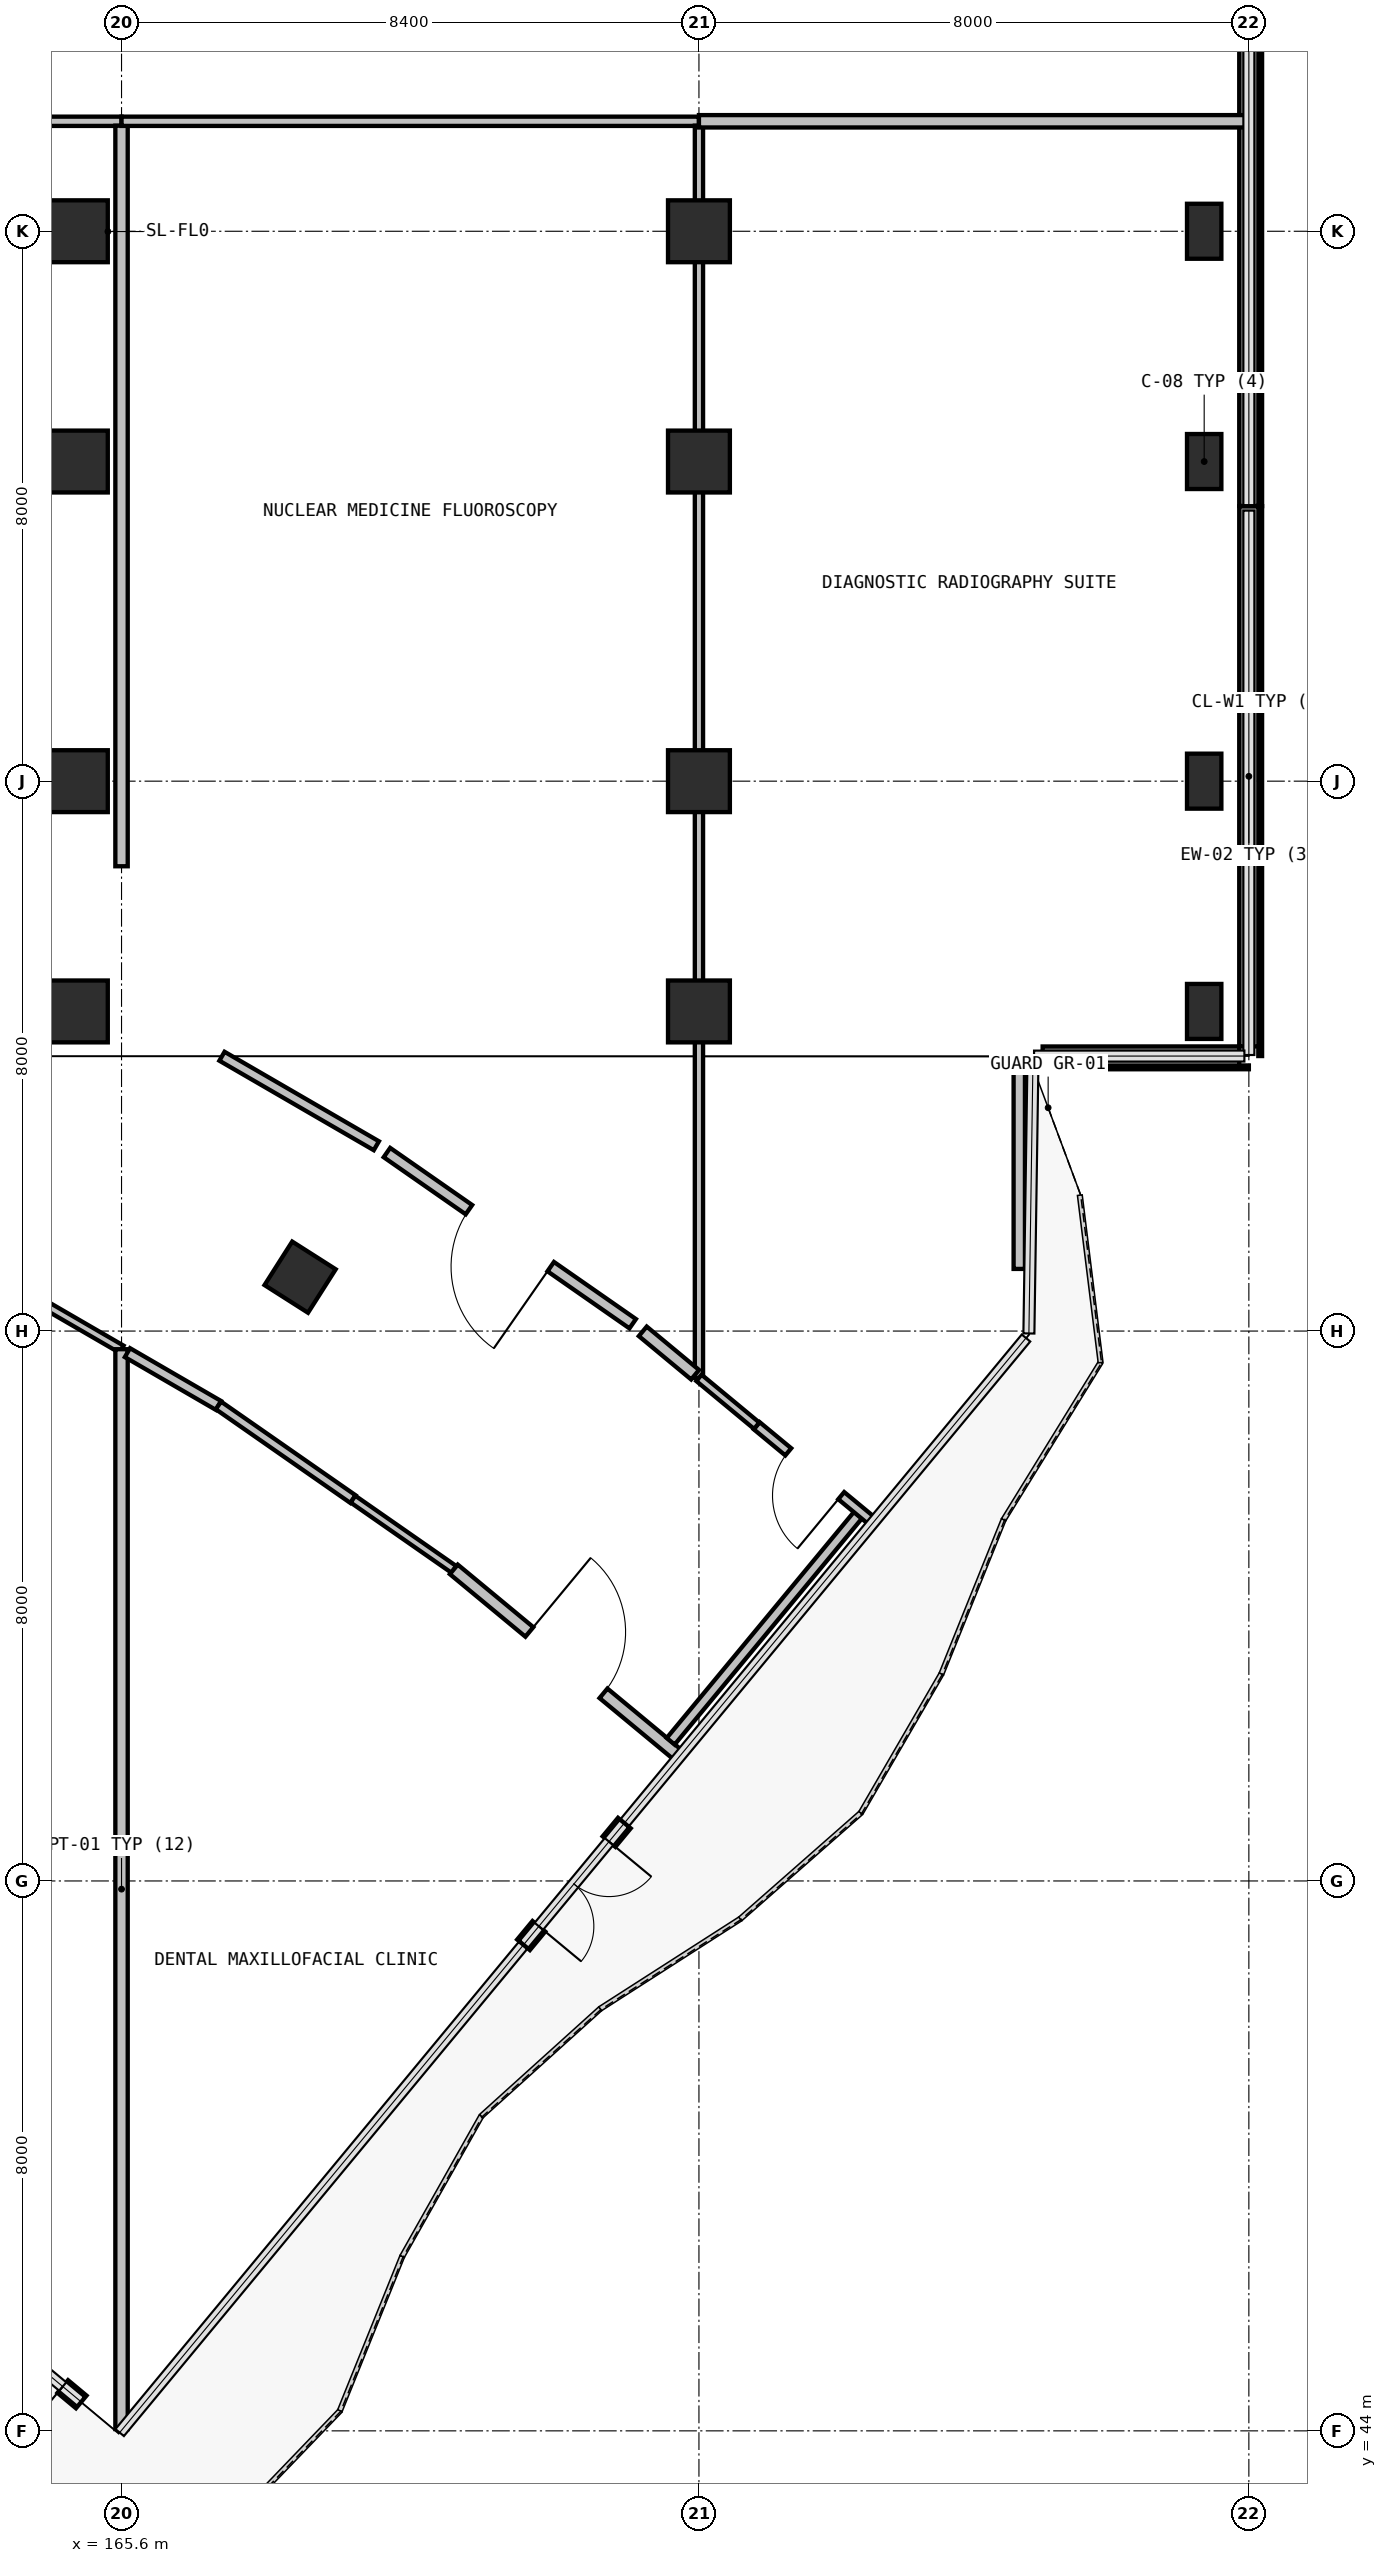
"""IFC4 building model, lengths in metres.
Left out: names, types, materials, properties, quantities, classifications, styles, units other than length and angle.
Written with IfcOpenShell. Run it as: python <this file> out.ifc"""

import sys

from ifc_helpers import new_model, si_unit, direction, frame, frame_2d, origin, origin_2d, place, context, subcontext, project, spatial, rectangle, extrude, element, fill, save


model = new_model("IFC4")
c1 = context("Model", 3, precision=1e-05, world=origin(), true_north=direction((0.0, 1.0)))
c2 = subcontext(c1, "Body", "Model", "MODEL_VIEW")
j1 = project(units=[si_unit("LENGTHUNIT", "METRE"), si_unit("PLANEANGLEUNIT", "RADIAN")], contexts=[c1])
p1 = place(None, origin())
s1 = spatial("IfcSite", under=j1, at=p1, CompositionType="ELEMENT")
p2 = place(p1, origin())
s2 = spatial("IfcBuilding", under=s1, at=p2, CompositionType="ELEMENT")
p3 = place(p2, origin())
s3 = spatial("IfcBuildingStorey", under=s2, at=p3, CompositionType="ELEMENT", Elevation=0.0)
for number, where, z_axis, x_axis in (
    (1, (164.95, 64.65, 0.0), (0.0, 0.0, 1.0), (1.0, 0.0, 0.0)),
    (2, (164.95, 68.0, 0.0), (0.0, 0.0, 1.0), (1.0, 0.0, 0.0)),
    (3, (164.95, 72.65, 0.0), (0.0, 0.0, 1.0), (1.0, 0.0, 0.0)),
    (4, (164.95, 76.0, 0.0), (0.0, 0.0, 1.0), (1.0, 0.0, 0.0)),
    (5, (174.0, 64.65, 0.0), (0.0, 0.0, 1.0), (1.0, 0.0, 0.0)),
    (6, (174.0, 68.0, 0.0), (0.0, 0.0, 1.0), (1.0, 0.0, 0.0)),
    (7, (174.0, 72.65, 0.0), (0.0, 0.0, 1.0), (1.0, 0.0, 0.0)),
    (8, (174.0, 76.0, 0.0), (0.0, 0.0, 1.0), (1.0, 0.0, 0.0)),
):
    element("IfcColumn", number, at=place(p3, frame(where, z_axis=z_axis, x_axis=x_axis)), inside=s3, PredefinedType="COLUMN", context=c2, shape_type="SweptSolid", body=[
        extrude(rectangle(XDim=0.9, YDim=0.9, at=origin_2d()), origin(), (0.0, 0.0, 1.0), 5.4),
    ])
for number, where, z_axis, x_axis in (
    (9, (181.35, 64.65, 0.0), (0.0, 0.0, 1.0), (1.0, 0.0, 0.0)),
    (10, (181.35, 68.0, 0.0), (0.0, 0.0, 1.0), (1.0, 0.0, 0.0)),
    (11, (181.35, 72.65, 0.0), (0.0, 0.0, 1.0), (1.0, 0.0, 0.0)),
    (12, (181.35, 76.0, 0.0), (0.0, 0.0, 1.0), (1.0, 0.0, 0.0)),
):
    element("IfcColumn", number, at=place(p3, frame(where, z_axis=z_axis, x_axis=x_axis)), inside=s3, PredefinedType="COLUMN", context=c2, shape_type="SweptSolid", body=[
        extrude(rectangle(XDim=0.5, YDim=0.8, at=origin_2d()), origin(), (0.0, 0.0, 1.0), 5.4),
    ])
p4 = place(p3, frame((168.198, 60.784, 0.0), z_axis=(0.0, 0.0, 1.0), x_axis=(0.537064068078, 0.843541455282, 0.0)))
e13 = element("IfcColumn", 13, at=p4, inside=s3, PredefinedType="COLUMN", context=c2, shape_type="SweptSolid", body=[
    extrude(rectangle(XDim=0.75, YDim=0.75, at=origin_2d()), origin(), (0.0, 0.0, 1.0), 5.4),
])
p5 = place(p3, frame((182.0, 79.999, 0.0), z_axis=(0.0, 0.0, 1.0), x_axis=(0.0, -1.0, 0.0)))
e14 = element("IfcWall", 14, at=p5, inside=s3, PredefinedType="SOLIDWALL", context=c2, shape_type="SweptSolid", body=[
    extrude(rectangle(XDim=7.996, YDim=0.28, at=frame_2d((3.998, 0.0))), origin(), (0.0, 0.0, 1.0), 0.94),
])
p6 = place(p3, frame((182.0, 71.999, 0.0), z_axis=(0.0, 0.0, 1.0), x_axis=(0.0, -1.0, 0.0)))
e15 = element("IfcWall", 15, at=p6, inside=s3, PredefinedType="SOLIDWALL", context=c2, shape_type="SweptSolid", body=[
    extrude(rectangle(XDim=7.858, YDim=0.28, at=frame_2d((3.929, 0.0))), origin(), (0.0, 0.0, 1.0), 0.94),
])
p7 = place(p3, frame((181.86, 64.001, 0.0), z_axis=(0.0, 0.0, 1.0), x_axis=(-0.999999941708, -0.000341442575, 0.0)))
e16 = element("IfcWall", 16, at=p7, inside=s3, PredefinedType="SOLIDWALL", context=c2, shape_type="SweptSolid", body=[
    extrude(rectangle(XDim=2.86, YDim=0.28, at=frame_2d((1.43, 0.0))), origin(), (0.0, 0.0, 1.0), 0.94),
])
p8 = place(p3, frame((172.915, 52.842, 0.0), z_axis=(0.0, 0.0, 1.0), x_axis=(-0.637926137679, -0.770097554123, 0.0)))
e17 = element("IfcWall", 17, at=p8, inside=s3, PredefinedType="SOLIDWALL", context=c2, shape_type="SweptSolid", body=[
    extrude(rectangle(XDim=2.3, YDim=0.24, at=frame_2d((1.15, 0.0))), origin(), (0.0, 0.0, 1.0), 2.32),
])
p9 = place(p8, frame((0.35, 0.0, 0.0)))
e18 = element("IfcOpeningElement", 18, at=p9, cuts=e17, PredefinedType="OPENING", context=c2, shape_type="SweptSolid", body=[
    extrude(rectangle(XDim=1.6, YDim=2.2, at=frame_2d((0.8, 1.1))), frame((0.0, 0.13, 0.0), z_axis=(0.0, -1.0, 0.0), x_axis=(1.0, 0.0, 0.0)), (0.0, 0.0, 1.0), 0.26),
])
p10 = place(p3, frame((165.014, 44.421, 0.0), z_axis=(0.0, 0.0, 1.0), x_axis=(-0.768438701021, 0.639923403833, 0.0)))
e19 = element("IfcWall", 19, at=p10, inside=s3, PredefinedType="SOLIDWALL", context=c2, shape_type="SweptSolid", body=[
    extrude(rectangle(XDim=2.301, YDim=0.24, at=frame_2d((1.15, 0.0))), origin(), (0.0, 0.0, 1.0), 2.32),
])
p11 = place(p10, frame((0.35, 0.0, 0.0)))
e20 = element("IfcOpeningElement", 20, at=p11, cuts=e19, PredefinedType="OPENING", context=c2, shape_type="SweptSolid", body=[
    extrude(rectangle(XDim=1.6, YDim=2.2, at=frame_2d((0.8, 1.1))), frame((0.0, 0.13, 0.0), z_axis=(0.0, -1.0, 0.0), x_axis=(1.0, 0.0, 0.0)), (0.0, 0.0, 1.0), 0.26),
])
p12 = place(p3, frame((163.4, 61.012, 0.0), z_axis=(0.0, 0.0, 1.0), x_axis=(0.865071180383, -0.501649133231, 0.0)))
e21 = element("IfcWall", 21, at=p12, inside=s3, PredefinedType="PARTITIONING", context=c2, shape_type="SweptSolid", body=[
    extrude(rectangle(XDim=2.543, YDim=0.12, at=frame_2d((1.272, 0.0))), origin(), (0.0, 0.0, 1.0), 5.08),
])
p13 = place(p3, frame((165.6, 59.736, 0.0), z_axis=(0.0, 0.0, 1.0), x_axis=(0.0, -1.0, 0.0)))
e22 = element("IfcWall", 22, at=p13, inside=s3, PredefinedType="PARTITIONING", context=c2, shape_type="SweptSolid", body=[
    extrude(rectangle(XDim=15.71, YDim=0.18, at=frame_2d((7.855, 0.0))), origin(), (0.0, 0.0, 1.0), 5.08),
])
p14 = place(p3, frame((162.797, 77.6, 0.0), z_axis=(0.0, 0.0, 1.0), x_axis=(1.0, 0.0, 0.0)))
e23 = element("IfcWall", 23, at=p14, inside=s3, PredefinedType="PARTITIONING", context=c2, shape_type="SweptSolid", body=[
    extrude(rectangle(XDim=2.803, YDim=0.135, at=frame_2d((1.401, 0.0))), origin(), (0.0, 0.0, 1.0), 5.08),
])
p15 = place(p3, frame((165.6, 77.536, 0.0), z_axis=(0.0, 0.0, 1.0), x_axis=(0.0, -1.0, 0.0)))
e24 = element("IfcWall", 24, at=p15, inside=s3, PredefinedType="PARTITIONING", context=c2, shape_type="SweptSolid", body=[
    extrude(rectangle(XDim=10.774, YDim=0.18, at=frame_2d((5.387, 0.0))), origin(), (0.0, 0.0, 1.0), 5.08),
])
p16 = place(p3, frame((165.686, 59.686, 0.0), z_axis=(0.0, 0.0, 1.0), x_axis=(0.864985497408, -0.501796860565, 0.0)))
e25 = element("IfcWall", 25, at=p16, inside=s3, PredefinedType="PARTITIONING", context=c2, shape_type="SweptSolid", body=[
    extrude(rectangle(XDim=1.531, YDim=0.15, at=frame_2d((0.765, 0.0))), origin(), (0.0, 0.0, 1.0), 5.08),
])
p17 = place(p3, frame((167.01, 58.918, 0.0), z_axis=(0.0, 0.0, 1.0), x_axis=(0.820585840309, -0.571523296712, 0.0)))
e26 = element("IfcWall", 26, at=p17, inside=s3, PredefinedType="PARTITIONING", context=c2, shape_type="SweptSolid", body=[
    extrude(rectangle(XDim=2.385, YDim=0.135, at=frame_2d((1.192, 0.0))), origin(), (0.0, 0.0, 1.0), 5.08),
])
p18 = place(p3, frame((168.967, 57.555, 0.0), z_axis=(0.0, 0.0, 1.0), x_axis=(0.820532078551, -0.571600479416, 0.0)))
e27 = element("IfcWall", 27, at=p18, inside=s3, PredefinedType="PARTITIONING", context=c2, shape_type="SweptSolid", body=[
    extrude(rectangle(XDim=1.788, YDim=0.12, at=frame_2d((0.894, 0.0))), origin(), (0.0, 0.0, 1.0), 5.08),
])
p19 = place(p3, frame((170.434, 56.533, 0.0), z_axis=(0.0, 0.0, 1.0), x_axis=(0.770184287696, -0.637821419353, 0.0)))
e28 = element("IfcWall", 28, at=p19, inside=s3, PredefinedType="PARTITIONING", context=c2, shape_type="SweptSolid", body=[
    extrude(rectangle(XDim=4.253, YDim=0.18, at=frame_2d((2.127, 0.0))), origin(), (0.0, 0.0, 1.0), 5.08),
])
p20 = place(p19, frame((1.427, 0.0, 0.0)))
e29 = element("IfcOpeningElement", 29, at=p20, cuts=e28, PredefinedType="OPENING", context=c2, shape_type="SweptSolid", body=[
    extrude(rectangle(XDim=1.4, YDim=2.15, at=frame_2d((0.7, 1.075))), frame((0.0, 0.1, 0.0), z_axis=(0.0, -1.0, 0.0), x_axis=(1.0, 0.0, 0.0)), (0.0, 0.0, 1.0), 0.2),
])
p21 = place(p3, frame((173.036, 60.107, 0.0), z_axis=(0.0, 0.0, 1.0), x_axis=(-0.820574971601, 0.571538901547, 0.0)))
e30 = element("IfcWall", 30, at=p21, inside=s3, PredefinedType="PARTITIONING", context=c2, shape_type="SweptSolid", body=[
    extrude(rectangle(XDim=4.357, YDim=0.165, at=frame_2d((2.178, 0.0))), origin(), (0.0, 0.0, 1.0), 5.08),
])
p22 = place(p21, frame((1.453, 0.0, 0.0)))
e31 = element("IfcOpeningElement", 31, at=p22, cuts=e30, PredefinedType="OPENING", context=c2, shape_type="SweptSolid", body=[
    extrude(rectangle(XDim=1.45, YDim=2.15, at=frame_2d((0.725, 1.075))), frame((0.0, 0.093, 0.0), z_axis=(0.0, -1.0, 0.0), x_axis=(1.0, 0.0, 0.0)), (0.0, 0.0, 1.0), 0.185),
])
p23 = place(p3, frame((169.307, 62.696, 0.0), z_axis=(0.0, 0.0, 1.0), x_axis=(-0.86512994763, 0.501547778097, 0.0)))
e32 = element("IfcWall", 32, at=p23, inside=s3, PredefinedType="PARTITIONING", context=c2, shape_type="SweptSolid", body=[
    extrude(rectangle(XDim=2.596, YDim=0.15, at=frame_2d((1.298, 0.0))), origin(), (0.0, 0.0, 1.0), 5.08),
])
p24 = place(p3, frame((165.6, 77.6, 0.0), z_axis=(0.0, 0.0, 1.0), x_axis=(1.0, 0.0, 0.0)))
e33 = element("IfcWall", 33, at=p24, inside=s3, PredefinedType="PARTITIONING", context=c2, shape_type="SweptSolid", body=[
    extrude(rectangle(XDim=8.4, YDim=0.135, at=frame_2d((4.2, 0.0))), origin(), (0.0, 0.0, 1.0), 5.08),
])
p25 = place(p3, frame((174.0, 77.536, 0.0), z_axis=(0.0, 0.0, 1.0), x_axis=(0.0, -1.0, 0.0)))
e34 = element("IfcWall", 34, at=p25, inside=s3, PredefinedType="PARTITIONING", context=c2, shape_type="SweptSolid", body=[
    extrude(rectangle(XDim=18.217, YDim=0.12, at=frame_2d((9.108, 0.0))), origin(), (0.0, 0.0, 1.0), 4.33),
])
p26 = place(p3, frame((173.944, 59.365, 0.0), z_axis=(0.0, 0.0, 1.0), x_axis=(-0.769737243157, 0.638360851319, 0.0)))
e35 = element("IfcWall", 35, at=p26, inside=s3, PredefinedType="PARTITIONING", context=c2, shape_type="SweptSolid", body=[
    extrude(rectangle(XDim=0.989, YDim=0.18, at=frame_2d((0.494, 0.0))), origin(), (0.0, 0.0, 1.0), 5.08),
])
p27 = place(p3, frame((178.66, 63.975, 0.0), z_axis=(0.0, 0.0, 1.0), x_axis=(0.0, -1.0, 0.0)))
e36 = element("IfcWall", 36, at=p27, inside=s3, PredefinedType="PARTITIONING", context=c2, shape_type="SweptSolid", body=[
    extrude(rectangle(XDim=3.071, YDim=0.165, at=frame_2d((1.536, 0.0))), origin(), (0.0, 0.0, 1.0), 5.08),
])
p28 = place(p3, frame((173.589, 54.032, 0.0), z_axis=(0.0, 0.0, 1.0), x_axis=(0.637765261242, 0.770230791096, 0.0)))
e37 = element("IfcWall", 37, at=p28, inside=s3, PredefinedType="PARTITIONING", context=c2, shape_type="SweptSolid", body=[
    extrude(rectangle(XDim=4.274, YDim=0.15, at=frame_2d((2.137, 0.0))), origin(), (0.0, 0.0, 1.0), 5.08),
])
p29 = place(p3, frame((176.53, 57.225, 0.0), z_axis=(0.0, 0.0, 1.0), x_axis=(-0.770533821636, 0.637399113362, 0.0)))
e38 = element("IfcWall", 38, at=p29, inside=s3, PredefinedType="PARTITIONING", context=c2, shape_type="SweptSolid", body=[
    extrude(rectangle(XDim=2.193, YDim=0.135, at=frame_2d((1.097, 0.0))), origin(), (0.0, 0.0, 1.0), 5.08),
])
p30 = place(p29, frame((0.597, 0.0, 0.0)))
e39 = element("IfcOpeningElement", 39, at=p30, cuts=e38, PredefinedType="OPENING", context=c2, shape_type="SweptSolid", body=[
    extrude(rectangle(XDim=1.0, YDim=2.15, at=frame_2d((0.5, 1.075))), frame((0.0, 0.077, 0.0), z_axis=(0.0, -1.0, 0.0), x_axis=(1.0, 0.0, 0.0)), (0.0, 0.0, 1.0), 0.155),
])
p31 = place(p3, frame((174.84, 58.623, 0.0), z_axis=(0.0, 0.0, 1.0), x_axis=(-0.770034125481, 0.638002700304, 0.0)))
e40 = element("IfcWall", 40, at=p31, inside=s3, PredefinedType="PARTITIONING", context=c2, shape_type="SweptSolid", body=[
    extrude(rectangle(XDim=1.091, YDim=0.12, at=frame_2d((0.545, 0.0))), origin(), (0.0, 0.0, 1.0), 5.08),
])
p32 = place(p3, frame((174.0, 77.6, 0.0), z_axis=(0.0, 0.0, 1.0), x_axis=(1.0, 0.0, 0.0)))
e41 = element("IfcWall", 41, at=p32, inside=s3, PredefinedType="PARTITIONING", context=c2, shape_type="SweptSolid", body=[
    extrude(rectangle(XDim=7.958, YDim=0.18, at=frame_2d((3.979, 0.0))), origin(), (0.0, 0.0, 1.0), 5.08),
])
p33 = place(p9, origin())
e42 = element("IfcDoor", 42, at=p33, inside=s3, OperationType="DOUBLE_DOOR_SINGLE_SWING", PredefinedType="DOOR", context=c2, shape_type="SweptSolid", body=[
    extrude(rectangle(XDim=1.6, YDim=2.2, at=frame_2d((0.8, 1.1))), frame((0.0, 0.025, 0.0), z_axis=(0.0, -1.0, 0.0), x_axis=(1.0, 0.0, 0.0)), (0.0, 0.0, 1.0), 0.05),
])
fill(e18, e42)
p34 = place(p11, origin())
e43 = element("IfcDoor", 43, at=p34, inside=s3, OperationType="DOUBLE_DOOR_SINGLE_SWING", PredefinedType="DOOR", context=c2, shape_type="SweptSolid", body=[
    extrude(rectangle(XDim=1.6, YDim=2.2, at=frame_2d((0.8, 1.1))), frame((0.0, 0.025, 0.0), z_axis=(0.0, -1.0, 0.0), x_axis=(1.0, 0.0, 0.0)), (0.0, 0.0, 1.0), 0.05),
])
fill(e20, e43)
p35 = place(p20, origin())
e44 = element("IfcDoor", 44, at=p35, inside=s3, OperationType="SINGLE_SWING_RIGHT", PredefinedType="DOOR", context=c2, shape_type="SweptSolid", body=[
    extrude(rectangle(XDim=1.4, YDim=2.15, at=frame_2d((0.7, 1.075))), frame((0.0, 0.025, 0.0), z_axis=(0.0, -1.0, 0.0), x_axis=(1.0, 0.0, 0.0)), (0.0, 0.0, 1.0), 0.05),
])
fill(e29, e44)
p36 = place(p22, origin())
e45 = element("IfcDoor", 45, at=p36, inside=s3, OperationType="SINGLE_SWING_LEFT", PredefinedType="DOOR", context=c2, shape_type="SweptSolid", body=[
    extrude(rectangle(XDim=1.45, YDim=2.15, at=frame_2d((0.725, 1.075))), frame((0.0, 0.025, 0.0), z_axis=(0.0, -1.0, 0.0), x_axis=(1.0, 0.0, 0.0)), (0.0, 0.0, 1.0), 0.05),
])
fill(e31, e45)
p37 = place(p30, origin())
e46 = element("IfcDoor", 46, at=p37, inside=s3, OperationType="SINGLE_SWING_RIGHT", PredefinedType="DOOR", context=c2, shape_type="SweptSolid", body=[
    extrude(rectangle(XDim=1.0, YDim=2.15, at=frame_2d((0.5, 1.075))), frame((0.0, 0.025, 0.0), z_axis=(0.0, -1.0, 0.0), x_axis=(1.0, 0.0, 0.0)), (0.0, 0.0, 1.0), 0.05),
])
fill(e39, e46)
save(model, sys.argv[1])
